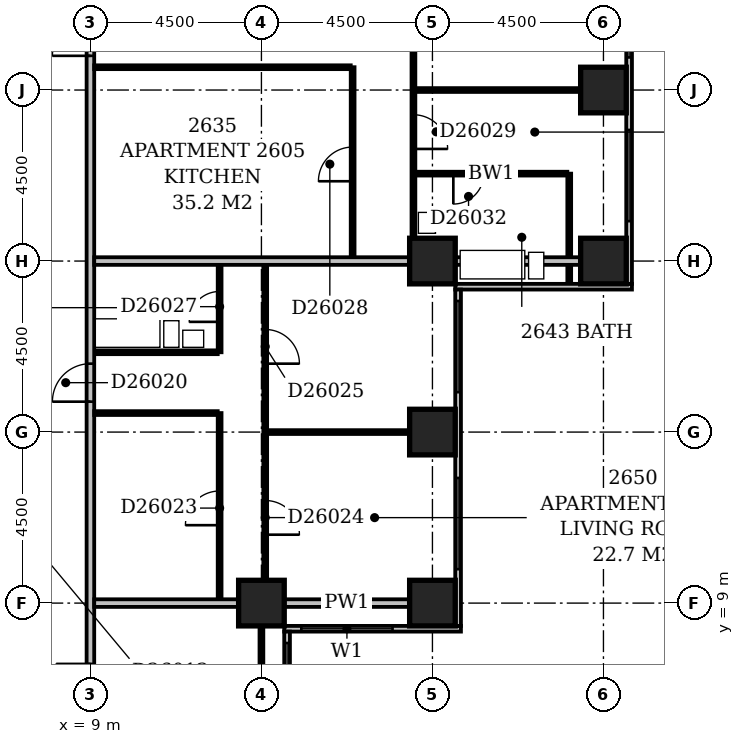
"""IFC4 building model, lengths in metres.
Left out: names, types, materials, properties, quantities, classifications, styles, units other than length and angle.
Written with IfcOpenShell. Run it as: python <this file> out.ifc"""

import sys

from ifc_helpers import new_model, si_unit, direction, frame, frame_2d, origin, origin_2d, place, context, subcontext, project, spatial, rectangle, extrude, element, fill, save


model = new_model("IFC4")
c1 = context("Model", 3, precision=1e-05, world=origin(), true_north=direction((0.0, 1.0)))
c2 = subcontext(c1, "Body", "Model", "MODEL_VIEW")
j1 = project(units=[si_unit("LENGTHUNIT", "METRE"), si_unit("PLANEANGLEUNIT", "RADIAN")], contexts=[c1])
p1 = place(None, origin())
s1 = spatial("IfcSite", under=j1, at=p1, CompositionType="ELEMENT")
p2 = place(p1, origin())
s2 = spatial("IfcBuilding", under=s1, at=p2, CompositionType="ELEMENT")
p3 = place(p2, frame((0.0, 0.0, 104.6)))
s3 = spatial("IfcBuildingStorey", under=s2, at=p3, CompositionType="ELEMENT", Elevation=104.6)
for number, where, z_axis, x_axis in (
    (1, (13.5, 9.0, -0.3), (0.0, 0.0, 1.0), (1.0, 0.0, 0.0)),
    (2, (18.0, 9.0, -0.3), (0.0, 0.0, 1.0), (1.0, 0.0, 0.0)),
    (3, (18.0, 13.5, -0.3), (0.0, 0.0, 1.0), (1.0, 0.0, 0.0)),
    (4, (18.0, 18.0, -0.3), (0.0, 0.0, 1.0), (1.0, 0.0, 0.0)),
    (5, (22.5, 18.0, -0.3), (0.0, 0.0, 1.0), (1.0, 0.0, 0.0)),
    (6, (22.5, 22.5, -0.3), (0.0, 0.0, 1.0), (1.0, 0.0, 0.0)),
):
    element("IfcColumn", number, at=place(p3, frame(where, z_axis=z_axis, x_axis=x_axis)), inside=s3, PredefinedType="COLUMN", context=c2, shape_type="SweptSolid", body=[
        extrude(rectangle(XDim=1.2, YDim=1.2, at=origin_2d()), origin(), (0.0, 0.0, 1.0), 3.45),
    ])
p4 = place(p3, frame((14.175, 3.9, 0.0), z_axis=(0.0, 0.0, 1.0), x_axis=(0.0, 1.0, 0.0)))
e7 = element("IfcWall", 7, at=p4, inside=s3, PredefinedType="STANDARD", context=c2, shape_type="SweptSolid", body=[
    extrude(rectangle(XDim=4.35, YDim=0.15, at=frame_2d((2.175, 0.0))), origin(), (0.0, 0.0, 1.0), 2.5),
])
p5 = place(p4, frame((1.65, 0.0, 0.6)))
e8 = element("IfcOpeningElement", 8, at=p5, cuts=e7, PredefinedType="OPENING", context=c2, shape_type="SweptSolid", body=[
    extrude(rectangle(XDim=2.4, YDim=1.8, at=frame_2d((1.2, 0.9))), frame((0.0, 0.087, 0.0), z_axis=(0.0, -1.0, 0.0), x_axis=(1.0, 0.0, 0.0)), (0.0, 0.0, 1.0), 0.174),
])
p6 = place(p3, frame((14.1, 8.325, 0.0), z_axis=(0.0, 0.0, 1.0), x_axis=(1.0, 0.0, 0.0)))
e9 = element("IfcWall", 9, at=p6, inside=s3, PredefinedType="STANDARD", context=c2, shape_type="SweptSolid", body=[
    extrude(rectangle(XDim=4.65, YDim=0.15, at=frame_2d((2.325, 0.0))), origin(), (0.0, 0.0, 1.0), 2.5),
])
p7 = place(p6, frame((0.45, 0.0, 0.6)))
e10 = element("IfcOpeningElement", 10, at=p7, cuts=e9, PredefinedType="OPENING", context=c2, shape_type="SweptSolid", body=[
    extrude(rectangle(XDim=2.4, YDim=1.8, at=frame_2d((1.2, 0.9))), frame((0.0, 0.087, 0.0), z_axis=(0.0, -1.0, 0.0), x_axis=(1.0, 0.0, 0.0)), (0.0, 0.0, 1.0), 0.174),
])
p8 = place(p3, frame((18.675, 8.4, 0.0), z_axis=(0.0, 0.0, 1.0), x_axis=(0.0, 1.0, 0.0)))
e11 = element("IfcWall", 11, at=p8, inside=s3, PredefinedType="STANDARD", context=c2, shape_type="SweptSolid", body=[
    extrude(rectangle(XDim=8.85, YDim=0.15, at=frame_2d((4.425, 0.0))), origin(), (0.0, 0.0, 1.0), 2.5),
])
p9 = place(p8, frame((1.493, 0.0, 0.6)))
e12 = element("IfcOpeningElement", 12, at=p9, cuts=e11, PredefinedType="OPENING", context=c2, shape_type="SweptSolid", body=[
    extrude(rectangle(XDim=2.4, YDim=1.8, at=frame_2d((1.2, 0.9))), frame((0.0, 0.087, 0.0), z_axis=(0.0, -1.0, 0.0), x_axis=(1.0, 0.0, 0.0)), (0.0, 0.0, 1.0), 0.174),
])
p10 = place(p8, frame((6.15, 0.0, 0.6)))
e13 = element("IfcOpeningElement", 13, at=p10, cuts=e11, PredefinedType="OPENING", context=c2, shape_type="SweptSolid", body=[
    extrude(rectangle(XDim=2.4, YDim=1.8, at=frame_2d((1.2, 0.9))), frame((0.0, 0.087, 0.0), z_axis=(0.0, -1.0, 0.0), x_axis=(1.0, 0.0, 0.0)), (0.0, 0.0, 1.0), 0.174),
])
p11 = place(p3, frame((18.6, 17.325, 0.0), z_axis=(0.0, 0.0, 1.0), x_axis=(1.0, 0.0, 0.0)))
e14 = element("IfcWall", 14, at=p11, inside=s3, PredefinedType="STANDARD", context=c2, shape_type="SweptSolid", body=[
    extrude(rectangle(XDim=4.65, YDim=0.15, at=frame_2d((2.325, 0.0))), origin(), (0.0, 0.0, 1.0), 2.5),
])
p12 = place(p3, frame((23.175, 17.4, 0.0), z_axis=(0.0, 0.0, 1.0), x_axis=(0.0, 1.0, 0.0)))
e15 = element("IfcWall", 15, at=p12, inside=s3, PredefinedType="STANDARD", context=c2, shape_type="SweptSolid", body=[
    extrude(rectangle(XDim=17.85, YDim=0.15, at=frame_2d((8.925, 0.0))), origin(), (0.0, 0.0, 1.0), 2.5),
])
p13 = place(p12, frame((1.65, 0.0, 0.6)))
e16 = element("IfcOpeningElement", 16, at=p13, cuts=e15, PredefinedType="OPENING", context=c2, shape_type="SweptSolid", body=[
    extrude(rectangle(XDim=2.4, YDim=1.8, at=frame_2d((1.2, 0.9))), frame((0.0, 0.087, 0.0), z_axis=(0.0, -1.0, 0.0), x_axis=(1.0, 0.0, 0.0)), (0.0, 0.0, 1.0), 0.174),
])
p14 = place(p12, frame((5.958, 0.0, 0.6)))
e17 = element("IfcOpeningElement", 17, at=p14, cuts=e15, PredefinedType="OPENING", context=c2, shape_type="SweptSolid", body=[
    extrude(rectangle(XDim=2.1, YDim=1.8, at=frame_2d((1.05, 0.9))), frame((0.0, 0.087, 0.0), z_axis=(0.0, -1.0, 0.0), x_axis=(1.0, 0.0, 0.0)), (0.0, 0.0, 1.0), 0.174),
])
p15 = place(p12, frame((10.65, 0.0, 0.6)))
e18 = element("IfcOpeningElement", 18, at=p15, cuts=e15, PredefinedType="OPENING", context=c2, shape_type="SweptSolid", body=[
    extrude(rectangle(XDim=2.4, YDim=1.8, at=frame_2d((1.2, 0.9))), frame((0.0, 0.087, 0.0), z_axis=(0.0, -1.0, 0.0), x_axis=(1.0, 0.0, 0.0)), (0.0, 0.0, 1.0), 0.174),
])
p16 = place(p12, frame((15.15, 0.0, 0.6)))
e19 = element("IfcOpeningElement", 19, at=p16, cuts=e15, PredefinedType="OPENING", context=c2, shape_type="SweptSolid", body=[
    extrude(rectangle(XDim=2.4, YDim=1.8, at=frame_2d((1.2, 0.9))), frame((0.0, 0.087, 0.0), z_axis=(0.0, -1.0, 0.0), x_axis=(1.0, 0.0, 0.0)), (0.0, 0.0, 1.0), 0.174),
])
p17 = place(p3, frame((9.0, 5.0, 0.0), z_axis=(0.0, 0.0, 1.0), x_axis=(0.0, 1.0, 0.0)))
e20 = element("IfcWall", 20, at=p17, inside=s3, PredefinedType="PARTITIONING", context=c2, shape_type="SweptSolid", body=[
    extrude(rectangle(XDim=44.5, YDim=0.2, at=frame_2d((22.25, 0.0))), origin(), (0.0, 0.0, 1.0), 3.15),
])
p18 = place(p17, frame((18.4, 0.0, 0.0)))
e21 = element("IfcOpeningElement", 21, at=p18, cuts=e20, PredefinedType="OPENING", context=c2, shape_type="SweptSolid", body=[
    extrude(rectangle(XDim=1.0, YDim=2.1, at=frame_2d((0.5, 1.05))), frame((0.0, 0.112, 0.0), z_axis=(0.0, -1.0, 0.0), x_axis=(1.0, 0.0, 0.0)), (0.0, 0.0, 1.0), 0.224),
])
p19 = place(p17, frame((9.3, 0.0, 0.0)))
e22 = element("IfcOpeningElement", 22, at=p19, cuts=e20, PredefinedType="OPENING", context=c2, shape_type="SweptSolid", body=[
    extrude(rectangle(XDim=1.0, YDim=2.1, at=frame_2d((0.5, 1.05))), frame((0.0, 0.112, 0.0), z_axis=(0.0, -1.0, 0.0), x_axis=(1.0, 0.0, 0.0)), (0.0, 0.0, 1.0), 0.224),
])
p20 = place(p17, frame((37.25, 0.0, 0.0)))
e23 = element("IfcOpeningElement", 23, at=p20, cuts=e20, PredefinedType="OPENING", context=c2, shape_type="SweptSolid", body=[
    extrude(rectangle(XDim=0.9, YDim=2.1, at=frame_2d((0.45, 1.05))), frame((0.0, 0.112, 0.0), z_axis=(0.0, -1.0, 0.0), x_axis=(1.0, 0.0, 0.0)), (0.0, 0.0, 1.0), 0.224),
])
p21 = place(p17, frame((1.5, 0.0, 0.0)))
e24 = element("IfcOpeningElement", 24, at=p21, cuts=e20, PredefinedType="OPENING", context=c2, shape_type="SweptSolid", body=[
    extrude(rectangle(XDim=0.9, YDim=2.1, at=frame_2d((0.45, 1.05))), frame((0.0, 0.112, 0.0), z_axis=(0.0, -1.0, 0.0), x_axis=(1.0, 0.0, 0.0)), (0.0, 0.0, 1.0), 0.224),
])
p22 = place(p3, frame((13.5, 5.1, 0.0), z_axis=(0.0, 0.0, 1.0), x_axis=(0.0, 1.0, 0.0)))
e25 = element("IfcWall", 25, at=p22, inside=s3, PredefinedType="PARTITIONING", context=c2, shape_type="SweptSolid", body=[
    extrude(rectangle(XDim=3.3, YDim=0.1, at=frame_2d((1.65, 0.0))), origin(), (0.0, 0.0, 1.0), 2.5),
])
p23 = place(p3, frame((9.1, 9.0, 0.0), z_axis=(0.0, 0.0, 1.0), x_axis=(1.0, 0.0, 0.0)))
e26 = element("IfcWall", 26, at=p23, inside=s3, PredefinedType="PARTITIONING", context=c2, shape_type="SweptSolid", body=[
    extrude(rectangle(XDim=3.8, YDim=0.2, at=frame_2d((1.9, 0.0))), origin(), (0.0, 0.0, 1.0), 3.15),
])
p24 = place(p3, frame((14.1, 9.0, 0.0), z_axis=(0.0, 0.0, 1.0), x_axis=(1.0, 0.0, 0.0)))
e27 = element("IfcWall", 27, at=p24, inside=s3, PredefinedType="PARTITIONING", context=c2, shape_type="SweptSolid", body=[
    extrude(rectangle(XDim=3.3, YDim=0.2, at=frame_2d((1.65, 0.0))), origin(), (0.0, 0.0, 1.0), 2.5),
])
p25 = place(p3, frame((12.4, 9.1, 0.0), z_axis=(0.0, 0.0, 1.0), x_axis=(0.0, 1.0, 0.0)))
e28 = element("IfcWall", 28, at=p25, inside=s3, PredefinedType="PARTITIONING", context=c2, shape_type="SweptSolid", body=[
    extrude(rectangle(XDim=4.9, YDim=0.1, at=frame_2d((2.45, 0.0))), origin(), (0.0, 0.0, 1.0), 3.15),
])
p26 = place(p25, frame((1.95, 0.0, 0.0)))
e29 = element("IfcOpeningElement", 29, at=p26, cuts=e28, PredefinedType="OPENING", context=c2, shape_type="SweptSolid", body=[
    extrude(rectangle(XDim=0.9, YDim=2.1, at=frame_2d((0.45, 1.05))), frame((0.0, 0.062, 0.0), z_axis=(0.0, -1.0, 0.0), x_axis=(1.0, 0.0, 0.0)), (0.0, 0.0, 1.0), 0.124),
])
p27 = place(p3, frame((13.6, 9.6, 0.0), z_axis=(0.0, 0.0, 1.0), x_axis=(0.0, 1.0, 0.0)))
e30 = element("IfcWall", 30, at=p27, inside=s3, PredefinedType="PARTITIONING", context=c2, shape_type="SweptSolid", body=[
    extrude(rectangle(XDim=8.3, YDim=0.1, at=frame_2d((4.15, 0.0))), origin(), (0.0, 0.0, 1.0), 3.15),
])
p28 = place(p27, frame((1.2, 0.0, 0.0)))
e31 = element("IfcOpeningElement", 31, at=p28, cuts=e30, PredefinedType="OPENING", context=c2, shape_type="SweptSolid", body=[
    extrude(rectangle(XDim=0.9, YDim=2.1, at=frame_2d((0.45, 1.05))), frame((0.0, 0.062, 0.0), z_axis=(0.0, -1.0, 0.0), x_axis=(1.0, 0.0, 0.0)), (0.0, 0.0, 1.0), 0.124),
])
p29 = place(p27, frame((5.7, 0.0, 0.0)))
e32 = element("IfcOpeningElement", 32, at=p29, cuts=e30, PredefinedType="OPENING", context=c2, shape_type="SweptSolid", body=[
    extrude(rectangle(XDim=0.9, YDim=2.1, at=frame_2d((0.45, 1.05))), frame((0.0, 0.062, 0.0), z_axis=(0.0, -1.0, 0.0), x_axis=(1.0, 0.0, 0.0)), (0.0, 0.0, 1.0), 0.124),
])
p30 = place(p3, frame((13.65, 13.5, 0.0), z_axis=(0.0, 0.0, 1.0), x_axis=(1.0, 0.0, 0.0)))
e33 = element("IfcWall", 33, at=p30, inside=s3, PredefinedType="PARTITIONING", context=c2, shape_type="SweptSolid", body=[
    extrude(rectangle(XDim=3.75, YDim=0.1, at=frame_2d((1.875, 0.0))), origin(), (0.0, 0.0, 1.0), 3.15),
])
p31 = place(p3, frame((9.1, 14.0, 0.0), z_axis=(0.0, 0.0, 1.0), x_axis=(1.0, 0.0, 0.0)))
e34 = element("IfcWall", 34, at=p31, inside=s3, PredefinedType="PARTITIONING", context=c2, shape_type="SweptSolid", body=[
    extrude(rectangle(XDim=3.25, YDim=0.1, at=frame_2d((1.625, 0.0))), origin(), (0.0, 0.0, 1.0), 3.15),
])
p32 = place(p3, frame((9.1, 15.6, 0.0), z_axis=(0.0, 0.0, 1.0), x_axis=(1.0, 0.0, 0.0)))
e35 = element("IfcWall", 35, at=p32, inside=s3, PredefinedType="PLUMBINGWALL", context=c2, shape_type="SweptSolid", body=[
    extrude(rectangle(XDim=3.25, YDim=0.1, at=frame_2d((1.625, 0.0))), origin(), (0.0, 0.0, 1.0), 3.15),
])
p33 = place(p3, frame((12.4, 15.6, 0.0), z_axis=(0.0, 0.0, 1.0), x_axis=(0.0, 1.0, 0.0)))
e36 = element("IfcWall", 36, at=p33, inside=s3, PredefinedType="PARTITIONING", context=c2, shape_type="SweptSolid", body=[
    extrude(rectangle(XDim=2.3, YDim=0.1, at=frame_2d((1.15, 0.0))), origin(), (0.0, 0.0, 1.0), 3.15),
])
p34 = place(p33, frame((0.8, 0.0, 0.0)))
e37 = element("IfcOpeningElement", 37, at=p34, cuts=e36, PredefinedType="OPENING", context=c2, shape_type="SweptSolid", body=[
    extrude(rectangle(XDim=0.8, YDim=2.1, at=frame_2d((0.4, 1.05))), frame((0.0, 0.062, 0.0), z_axis=(0.0, -1.0, 0.0), x_axis=(1.0, 0.0, 0.0)), (0.0, 0.0, 1.0), 0.124),
])
p35 = place(p3, frame((21.6, 17.4, 0.0), z_axis=(0.0, 0.0, 1.0), x_axis=(0.0, 1.0, 0.0)))
e38 = element("IfcWall", 38, at=p35, inside=s3, PredefinedType="PLUMBINGWALL", context=c2, shape_type="SweptSolid", body=[
    extrude(rectangle(XDim=2.9, YDim=0.1, at=frame_2d((1.45, 0.0))), origin(), (0.0, 0.0, 1.0), 3.15),
])
p36 = place(p3, frame((9.1, 18.0, 0.0), z_axis=(0.0, 0.0, 1.0), x_axis=(1.0, 0.0, 0.0)))
e39 = element("IfcWall", 39, at=p36, inside=s3, PredefinedType="PARTITIONING", context=c2, shape_type="SweptSolid", body=[
    extrude(rectangle(XDim=8.3, YDim=0.2, at=frame_2d((4.15, 0.0))), origin(), (0.0, 0.0, 1.0), 2.45),
])
p37 = place(p3, frame((18.6, 18.0, 0.0), z_axis=(0.0, 0.0, 1.0), x_axis=(1.0, 0.0, 0.0)))
e40 = element("IfcWall", 40, at=p37, inside=s3, PredefinedType="PARTITIONING", context=c2, shape_type="SweptSolid", body=[
    extrude(rectangle(XDim=3.3, YDim=0.2, at=frame_2d((1.65, 0.0))), origin(), (0.0, 0.0, 1.0), 2.5),
])
p38 = place(p3, frame((15.9, 18.1, 0.0), z_axis=(0.0, 0.0, 1.0), x_axis=(0.0, 1.0, 0.0)))
e41 = element("IfcWall", 41, at=p38, inside=s3, PredefinedType="PARTITIONING", context=c2, shape_type="SweptSolid", body=[
    extrude(rectangle(XDim=5.0, YDim=0.1, at=frame_2d((2.5, 0.0))), origin(), (0.0, 0.0, 1.0), 3.15),
])
p39 = place(p38, frame((2.0, 0.0, 0.0)))
e42 = element("IfcOpeningElement", 42, at=p39, cuts=e41, PredefinedType="OPENING", context=c2, shape_type="SweptSolid", body=[
    extrude(rectangle(XDim=0.9, YDim=2.1, at=frame_2d((0.45, 1.05))), frame((0.0, 0.062, 0.0), z_axis=(0.0, -1.0, 0.0), x_axis=(1.0, 0.0, 0.0)), (0.0, 0.0, 1.0), 0.124),
])
p40 = place(p3, frame((17.5, 18.1, 0.0), z_axis=(0.0, 0.0, 1.0), x_axis=(0.0, 1.0, 0.0)))
e43 = element("IfcWall", 43, at=p40, inside=s3, PredefinedType="PARTITIONING", context=c2, shape_type="SweptSolid", body=[
    extrude(rectangle(XDim=17.8, YDim=0.1, at=frame_2d((8.9, 0.0))), origin(), (0.0, 0.0, 1.0), 3.15),
])
p41 = place(p40, frame((2.85, 0.0, 0.0)))
e44 = element("IfcOpeningElement", 44, at=p41, cuts=e43, PredefinedType="OPENING", context=c2, shape_type="SweptSolid", body=[
    extrude(rectangle(XDim=0.9, YDim=2.1, at=frame_2d((0.45, 1.05))), frame((0.0, 0.062, 0.0), z_axis=(0.0, -1.0, 0.0), x_axis=(1.0, 0.0, 0.0)), (0.0, 0.0, 1.0), 0.124),
])
p42 = place(p40, frame((8.4, 0.0, 0.0)))
e45 = element("IfcOpeningElement", 45, at=p42, cuts=e43, PredefinedType="OPENING", context=c2, shape_type="SweptSolid", body=[
    extrude(rectangle(XDim=0.9, YDim=2.1, at=frame_2d((0.45, 1.05))), frame((0.0, 0.062, 0.0), z_axis=(0.0, -1.0, 0.0), x_axis=(1.0, 0.0, 0.0)), (0.0, 0.0, 1.0), 0.124),
])
p43 = place(p40, frame((14.05, 0.0, 0.0)))
e46 = element("IfcOpeningElement", 46, at=p43, cuts=e43, PredefinedType="OPENING", context=c2, shape_type="SweptSolid", body=[
    extrude(rectangle(XDim=0.9, YDim=2.1, at=frame_2d((0.45, 1.05))), frame((0.0, 0.062, 0.0), z_axis=(0.0, -1.0, 0.0), x_axis=(1.0, 0.0, 0.0)), (0.0, 0.0, 1.0), 0.124),
])
p44 = place(p3, frame((17.55, 20.3, 0.0), z_axis=(0.0, 0.0, 1.0), x_axis=(1.0, 0.0, 0.0)))
e47 = element("IfcWall", 47, at=p44, inside=s3, PredefinedType="PLUMBINGWALL", context=c2, shape_type="SweptSolid", body=[
    extrude(rectangle(XDim=4.0, YDim=0.1, at=frame_2d((2.0, 0.0))), origin(), (0.0, 0.0, 1.0), 3.15),
])
p45 = place(p44, frame((1.0, 0.0, 0.0)))
e48 = element("IfcOpeningElement", 48, at=p45, cuts=e47, PredefinedType="OPENING", context=c2, shape_type="SweptSolid", body=[
    extrude(rectangle(XDim=0.8, YDim=2.1, at=frame_2d((0.4, 1.05))), frame((0.0, 0.062, 0.0), z_axis=(0.0, -1.0, 0.0), x_axis=(1.0, 0.0, 0.0)), (0.0, 0.0, 1.0), 0.124),
])
p46 = place(p3, frame((17.55, 22.5, 0.0), z_axis=(0.0, 0.0, 1.0), x_axis=(1.0, 0.0, 0.0)))
e49 = element("IfcWall", 49, at=p46, inside=s3, PredefinedType="PARTITIONING", context=c2, shape_type="SweptSolid", body=[
    extrude(rectangle(XDim=4.35, YDim=0.1, at=frame_2d((2.175, 0.0))), origin(), (0.0, 0.0, 1.0), 3.15),
])
p47 = place(p3, frame((9.1, 23.1, 0.0), z_axis=(0.0, 0.0, 1.0), x_axis=(1.0, 0.0, 0.0)))
e50 = element("IfcWall", 50, at=p47, inside=s3, PredefinedType="PARTITIONING", context=c2, shape_type="SweptSolid", body=[
    extrude(rectangle(XDim=6.75, YDim=0.1, at=frame_2d((3.375, 0.0))), origin(), (0.0, 0.0, 1.0), 3.15),
])
p48 = place(p5, origin())
e51 = element("IfcWindow", 51, at=p48, inside=s3, PartitioningType="SINGLE_PANEL", PredefinedType="WINDOW", context=c2, shape_type="SweptSolid", body=[
    extrude(rectangle(XDim=2.4, YDim=1.8, at=frame_2d((1.2, 0.9))), frame((0.0, 0.03, 0.0), z_axis=(0.0, -1.0, 0.0), x_axis=(1.0, 0.0, 0.0)), (0.0, 0.0, 1.0), 0.06),
])
fill(e8, e51)
p49 = place(p7, origin())
e52 = element("IfcWindow", 52, at=p49, inside=s3, PartitioningType="SINGLE_PANEL", PredefinedType="WINDOW", context=c2, shape_type="SweptSolid", body=[
    extrude(rectangle(XDim=2.4, YDim=1.8, at=frame_2d((1.2, 0.9))), frame((0.0, 0.03, 0.0), z_axis=(0.0, -1.0, 0.0), x_axis=(1.0, 0.0, 0.0)), (0.0, 0.0, 1.0), 0.06),
])
fill(e10, e52)
p50 = place(p9, origin())
e53 = element("IfcWindow", 53, at=p50, inside=s3, PartitioningType="SINGLE_PANEL", PredefinedType="WINDOW", context=c2, shape_type="SweptSolid", body=[
    extrude(rectangle(XDim=2.4, YDim=1.8, at=frame_2d((1.2, 0.9))), frame((0.0, 0.03, 0.0), z_axis=(0.0, -1.0, 0.0), x_axis=(1.0, 0.0, 0.0)), (0.0, 0.0, 1.0), 0.06),
])
fill(e12, e53)
p51 = place(p10, origin())
e54 = element("IfcWindow", 54, at=p51, inside=s3, PartitioningType="SINGLE_PANEL", PredefinedType="WINDOW", context=c2, shape_type="SweptSolid", body=[
    extrude(rectangle(XDim=2.4, YDim=1.8, at=frame_2d((1.2, 0.9))), frame((0.0, 0.03, 0.0), z_axis=(0.0, -1.0, 0.0), x_axis=(1.0, 0.0, 0.0)), (0.0, 0.0, 1.0), 0.06),
])
fill(e13, e54)
p52 = place(p13, origin())
e55 = element("IfcWindow", 55, at=p52, inside=s3, PartitioningType="SINGLE_PANEL", PredefinedType="WINDOW", context=c2, shape_type="SweptSolid", body=[
    extrude(rectangle(XDim=2.4, YDim=1.8, at=frame_2d((1.2, 0.9))), frame((0.0, 0.03, 0.0), z_axis=(0.0, -1.0, 0.0), x_axis=(1.0, 0.0, 0.0)), (0.0, 0.0, 1.0), 0.06),
])
fill(e16, e55)
p53 = place(p14, origin())
e56 = element("IfcWindow", 56, at=p53, inside=s3, PartitioningType="SINGLE_PANEL", PredefinedType="WINDOW", context=c2, shape_type="SweptSolid", body=[
    extrude(rectangle(XDim=2.1, YDim=1.8, at=frame_2d((1.05, 0.9))), frame((0.0, 0.03, 0.0), z_axis=(0.0, -1.0, 0.0), x_axis=(1.0, 0.0, 0.0)), (0.0, 0.0, 1.0), 0.06),
])
fill(e17, e56)
p54 = place(p18, origin())
e57 = element("IfcDoor", 57, at=p54, inside=s3, OperationType="SINGLE_SWING_LEFT", PredefinedType="DOOR", context=c2, shape_type="SweptSolid", body=[
    extrude(rectangle(XDim=1.0, YDim=2.1, at=frame_2d((0.5, 1.05))), frame((0.0, 0.025, 0.0), z_axis=(0.0, -1.0, 0.0), x_axis=(1.0, 0.0, 0.0)), (0.0, 0.0, 1.0), 0.05),
])
fill(e21, e57)
p55 = place(p19, origin())
e58 = element("IfcDoor", 58, at=p55, inside=s3, OperationType="SINGLE_SWING_LEFT", PredefinedType="DOOR", context=c2, shape_type="SweptSolid", body=[
    extrude(rectangle(XDim=1.0, YDim=2.1, at=frame_2d((0.5, 1.05))), frame((0.0, 0.025, 0.0), z_axis=(0.0, -1.0, 0.0), x_axis=(1.0, 0.0, 0.0)), (0.0, 0.0, 1.0), 0.05),
])
fill(e22, e58)
p56 = place(p26, origin())
e59 = element("IfcDoor", 59, at=p56, inside=s3, OperationType="SINGLE_SWING_LEFT", PredefinedType="DOOR", context=c2, shape_type="SweptSolid", body=[
    extrude(rectangle(XDim=0.9, YDim=2.1, at=frame_2d((0.45, 1.05))), frame((0.0, 0.025, 0.0), z_axis=(0.0, -1.0, 0.0), x_axis=(1.0, 0.0, 0.0)), (0.0, 0.0, 1.0), 0.05),
])
fill(e29, e59)
p57 = place(p28, frame((0.9, 0.0, 0.0), z_axis=(0.0, 0.0, 1.0), x_axis=(-1.0, 0.0, 0.0)))
e60 = element("IfcDoor", 60, at=p57, inside=s3, OperationType="SINGLE_SWING_RIGHT", PredefinedType="DOOR", context=c2, shape_type="SweptSolid", body=[
    extrude(rectangle(XDim=0.9, YDim=2.1, at=frame_2d((0.45, 1.05))), frame((0.0, 0.025, 0.0), z_axis=(0.0, -1.0, 0.0), x_axis=(1.0, 0.0, 0.0)), (0.0, 0.0, 1.0), 0.05),
])
fill(e31, e60)
p58 = place(p29, frame((0.9, 0.0, 0.0), z_axis=(0.0, 0.0, 1.0), x_axis=(-1.0, 0.0, 0.0)))
e61 = element("IfcDoor", 61, at=p58, inside=s3, OperationType="SINGLE_SWING_RIGHT", PredefinedType="DOOR", context=c2, shape_type="SweptSolid", body=[
    extrude(rectangle(XDim=0.9, YDim=2.1, at=frame_2d((0.45, 1.05))), frame((0.0, 0.025, 0.0), z_axis=(0.0, -1.0, 0.0), x_axis=(1.0, 0.0, 0.0)), (0.0, 0.0, 1.0), 0.05),
])
fill(e32, e61)
p59 = place(p34, origin())
e62 = element("IfcDoor", 62, at=p59, inside=s3, OperationType="SINGLE_SWING_LEFT", PredefinedType="DOOR", context=c2, shape_type="SweptSolid", body=[
    extrude(rectangle(XDim=0.8, YDim=2.1, at=frame_2d((0.4, 1.05))), frame((0.0, 0.025, 0.0), z_axis=(0.0, -1.0, 0.0), x_axis=(1.0, 0.0, 0.0)), (0.0, 0.0, 1.0), 0.05),
])
fill(e37, e62)
p60 = place(p39, origin())
e63 = element("IfcDoor", 63, at=p60, inside=s3, OperationType="SINGLE_SWING_LEFT", PredefinedType="DOOR", context=c2, shape_type="SweptSolid", body=[
    extrude(rectangle(XDim=0.9, YDim=2.1, at=frame_2d((0.45, 1.05))), frame((0.0, 0.025, 0.0), z_axis=(0.0, -1.0, 0.0), x_axis=(1.0, 0.0, 0.0)), (0.0, 0.0, 1.0), 0.05),
])
fill(e42, e63)
p61 = place(p41, frame((0.9, 0.0, 0.0), z_axis=(0.0, 0.0, 1.0), x_axis=(-1.0, 0.0, 0.0)))
e64 = element("IfcDoor", 64, at=p61, inside=s3, OperationType="SINGLE_SWING_RIGHT", PredefinedType="DOOR", context=c2, shape_type="SweptSolid", body=[
    extrude(rectangle(XDim=0.9, YDim=2.1, at=frame_2d((0.45, 1.05))), frame((0.0, 0.025, 0.0), z_axis=(0.0, -1.0, 0.0), x_axis=(1.0, 0.0, 0.0)), (0.0, 0.0, 1.0), 0.05),
])
fill(e44, e64)
p62 = place(p45, frame((0.8, 0.0, 0.0), z_axis=(0.0, 0.0, 1.0), x_axis=(-1.0, 0.0, 0.0)))
e65 = element("IfcDoor", 65, at=p62, inside=s3, OperationType="SINGLE_SWING_RIGHT", PredefinedType="DOOR", context=c2, shape_type="SweptSolid", body=[
    extrude(rectangle(XDim=0.8, YDim=2.1, at=frame_2d((0.4, 1.05))), frame((0.0, 0.025, 0.0), z_axis=(0.0, -1.0, 0.0), x_axis=(1.0, 0.0, 0.0)), (0.0, 0.0, 1.0), 0.05),
])
fill(e48, e65)
save(model, sys.argv[1])
